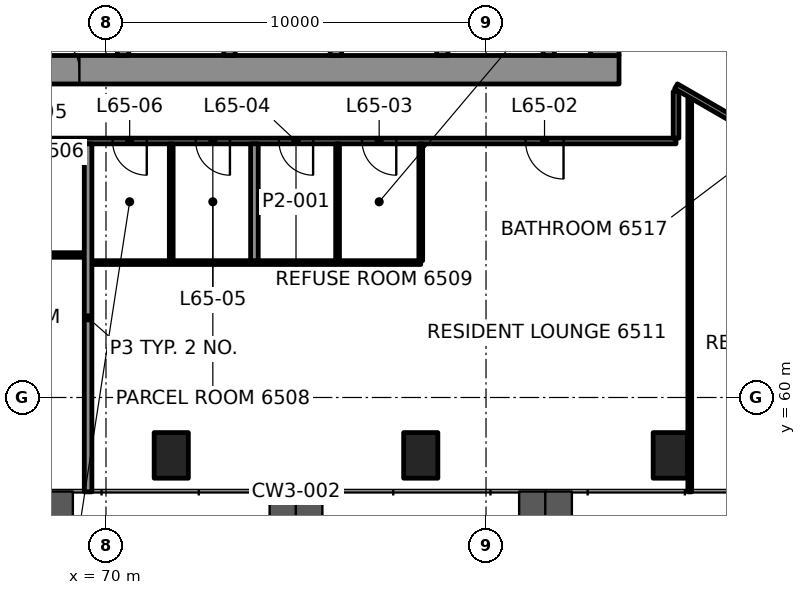
"""IFC4 building model, lengths in metres.
Left out: names, types, materials, properties, quantities, classifications, styles, units other than length and angle.
Written with IfcOpenShell. Run it as: python <this file> out.ifc"""

import sys

from ifc_helpers import new_model, si_unit, direction, frame, frame_2d, origin, origin_2d, place, context, subcontext, project, spatial, rectangle, hollow_rectangle, extrude, element, fill, save


model = new_model("IFC4")
c1 = context("Model", 3, precision=1e-05, world=origin(), true_north=direction((0.0, 1.0)))
c2 = subcontext(c1, "Body", "Model", "MODEL_VIEW")
j1 = project(units=[si_unit("LENGTHUNIT", "METRE"), si_unit("PLANEANGLEUNIT", "RADIAN")], contexts=[c1])
p1 = place(None, origin())
s1 = spatial("IfcSite", under=j1, at=p1, CompositionType="ELEMENT")
p2 = place(p1, origin())
s2 = spatial("IfcBuilding", under=s1, at=p2, CompositionType="ELEMENT")
p3 = place(p2, frame((0.0, 0.0, 274.1)))
s3 = spatial("IfcBuildingStorey", under=s2, at=p3, CompositionType="ELEMENT", Elevation=274.1)
for number, where, z_axis, x_axis in (
    (1, (71.717, 58.476, -0.0), (0.0, 0.0, 1.0), (1.0, 0.0, 0.0)),
    (2, (78.283, 58.476, -0.0), (0.0, 0.0, 1.0), (1.0, 0.0, 0.0)),
    (3, (84.848, 58.476, -0.0), (0.0, 0.0, 1.0), (1.0, 0.0, 0.0)),
):
    element("IfcColumn", number, at=place(p3, frame(where, z_axis=z_axis, x_axis=x_axis)), inside=s3, PredefinedType="COLUMN", context=c2, shape_type="SweptSolid", body=[
        extrude(hollow_rectangle(XDim=0.9, YDim=1.2, WallThickness=0.06, at=origin_2d()), origin(), (0.0, 0.0, 1.0), 3.5),
    ])
p4 = place(p3, frame((66.5, 68.625, 0.0), z_axis=(0.0, 0.0, 1.0), x_axis=(1.0, 0.0, 0.0)))
e4 = element("IfcWall", 4, at=p4, inside=s3, PredefinedType="SHEAR", context=c2, shape_type="SweptSolid", body=[
    extrude(rectangle(XDim=17.0, YDim=0.75, at=frame_2d((8.5, 0.0))), origin(), (0.0, 0.0, 1.0), 3.3),
])
p5 = place(p4, frame((1.9, 0.0, 0.0)))
e5 = element("IfcOpeningElement", 5, at=p5, cuts=e4, PredefinedType="OPENING", context=c2, shape_type="SweptSolid", body=[
    extrude(rectangle(XDim=0.9, YDim=2.1, at=frame_2d((0.45, 1.05))), frame((0.0, 0.385, 0.0), z_axis=(0.0, -1.0, 0.0), x_axis=(1.0, 0.0, 0.0)), (0.0, 0.0, 1.0), 0.77),
])
p6 = place(p3, frame((83.125, 69.0, 0.0), z_axis=(0.0, 0.0, 1.0), x_axis=(0.0, 1.0, 0.0)))
e6 = element("IfcWall", 6, at=p6, inside=s3, PredefinedType="SHEAR", context=c2, shape_type="SweptSolid", body=[
    extrude(rectangle(XDim=12.0, YDim=0.75, at=frame_2d((6.0, 0.0))), origin(), (0.0, 0.0, 1.0), 3.3),
])
p7 = place(p6, frame((3.4, 0.0, 0.0)))
e7 = element("IfcOpeningElement", 7, at=p7, cuts=e6, PredefinedType="OPENING", context=c2, shape_type="SweptSolid", body=[
    extrude(rectangle(XDim=1.8, YDim=2.1, at=frame_2d((0.9, 1.05))), frame((0.0, 0.385, 0.0), z_axis=(0.0, -1.0, 0.0), x_axis=(1.0, 0.0, 0.0)), (0.0, 0.0, 1.0), 0.77),
])
for number, where, z_axis, x_axis in (
    (8, (70.45, 69.0, 0.0), (0.0, 0.0, 1.0), (0.0, 1.0, 0.0)),
    (9, (73.25, 69.0, 0.0), (0.0, 0.0, 1.0), (0.0, 1.0, 0.0)),
    (10, (76.05, 69.0, 0.0), (0.0, 0.0, 1.0), (0.0, 1.0, 0.0)),
    (11, (78.85, 69.0, 0.0), (0.0, 0.0, 1.0), (0.0, 1.0, 0.0)),
    (12, (81.65, 69.0, 0.0), (0.0, 0.0, 1.0), (0.0, 1.0, 0.0)),
):
    element("IfcWall", number, at=place(p3, frame(where, z_axis=z_axis, x_axis=x_axis)), inside=s3, PredefinedType="SHEAR", context=c2, shape_type="SweptSolid", body=[
        extrude(rectangle(XDim=2.6, YDim=0.3, at=frame_2d((1.3, 0.0))), origin(), (0.0, 0.0, 1.0), 3.3),
    ])
p8 = place(p3, frame((69.629, 63.55, 0.0), z_axis=(0.0, 0.0, 1.0), x_axis=(1.0, 0.0, 0.0)))
e13 = element("IfcWall", 13, at=p8, inside=s3, PredefinedType="PARTITIONING", context=c2, shape_type="SweptSolid", body=[
    extrude(rectangle(XDim=8.653, YDim=0.1, at=frame_2d((4.326, 0.0))), origin(), (0.0, 0.0, 1.0), 2.7),
])
p9 = place(p3, frame((63.434, 63.75, 0.0), z_axis=(0.0, 0.0, 1.0), x_axis=(1.0, 0.0, 0.0)))
e14 = element("IfcWall", 14, at=p9, inside=s3, PredefinedType="PARTITIONING", context=c2, shape_type="SweptSolid", body=[
    extrude(rectangle(XDim=5.995, YDim=0.12, at=frame_2d((2.997, 0.0))), origin(), (0.0, 0.0, 1.0), 2.7),
])
p10 = place(p9, frame((3.199, 0.0, 0.0)))
e15 = element("IfcOpeningElement", 15, at=p10, cuts=e14, PredefinedType="OPENING", context=c2, shape_type="SweptSolid", body=[
    extrude(rectangle(XDim=0.9, YDim=2.1, at=frame_2d((0.45, 1.05))), frame((0.0, 0.07, 0.0), z_axis=(0.0, -1.0, 0.0), x_axis=(1.0, 0.0, 0.0)), (0.0, 0.0, 1.0), 0.14),
])
p11 = place(p3, frame((85.0, 66.75, 0.0), z_axis=(0.0, 0.0, 1.0), x_axis=(-1.0, 0.0, 0.0)))
e16 = element("IfcWall", 16, at=p11, inside=s3, PredefinedType="PARTITIONING", context=c2, shape_type="SweptSolid", body=[
    extrude(rectangle(XDim=19.999, YDim=0.15, at=frame_2d((10.0, 0.0))), origin(), (0.0, 0.0, 1.0), 2.7),
])
p12 = place(p11, frame((2.96, 0.0, 0.0)))
e17 = element("IfcOpeningElement", 17, at=p12, cuts=e16, PredefinedType="OPENING", context=c2, shape_type="SweptSolid", body=[
    extrude(rectangle(XDim=1.0, YDim=2.1, at=frame_2d((0.5, 1.05))), frame((0.0, 0.085, 0.0), z_axis=(0.0, -1.0, 0.0), x_axis=(1.0, 0.0, 0.0)), (0.0, 0.0, 1.0), 0.17),
])
p13 = place(p11, frame((7.361, 0.0, 0.0)))
e18 = element("IfcOpeningElement", 18, at=p13, cuts=e16, PredefinedType="OPENING", context=c2, shape_type="SweptSolid", body=[
    extrude(rectangle(XDim=0.9, YDim=2.1, at=frame_2d((0.45, 1.05))), frame((0.0, 0.085, 0.0), z_axis=(0.0, -1.0, 0.0), x_axis=(1.0, 0.0, 0.0)), (0.0, 0.0, 1.0), 0.17),
])
p14 = place(p11, frame((9.55, 0.0, 0.0)))
e19 = element("IfcOpeningElement", 19, at=p14, cuts=e16, PredefinedType="OPENING", context=c2, shape_type="SweptSolid", body=[
    extrude(rectangle(XDim=0.9, YDim=2.1, at=frame_2d((0.45, 1.05))), frame((0.0, 0.085, 0.0), z_axis=(0.0, -1.0, 0.0), x_axis=(1.0, 0.0, 0.0)), (0.0, 0.0, 1.0), 0.17),
])
p15 = place(p11, frame((11.738, 0.0, 0.0)))
e20 = element("IfcOpeningElement", 20, at=p15, cuts=e16, PredefinedType="OPENING", context=c2, shape_type="SweptSolid", body=[
    extrude(rectangle(XDim=0.9, YDim=2.1, at=frame_2d((0.45, 1.05))), frame((0.0, 0.085, 0.0), z_axis=(0.0, -1.0, 0.0), x_axis=(1.0, 0.0, 0.0)), (0.0, 0.0, 1.0), 0.17),
])
p16 = place(p11, frame((13.926, 0.0, 0.0)))
e21 = element("IfcOpeningElement", 21, at=p16, cuts=e16, PredefinedType="OPENING", context=c2, shape_type="SweptSolid", body=[
    extrude(rectangle(XDim=0.9, YDim=2.1, at=frame_2d((0.45, 1.05))), frame((0.0, 0.085, 0.0), z_axis=(0.0, -1.0, 0.0), x_axis=(1.0, 0.0, 0.0)), (0.0, 0.0, 1.0), 0.17),
])
p17 = place(p3, frame((85.361, 57.516, 0.0), z_axis=(0.0, 0.0, 1.0), x_axis=(0.0, 1.0, 0.0)))
e22 = element("IfcWall", 22, at=p17, inside=s3, PredefinedType="PARTITIONING", context=c2, shape_type="SweptSolid", body=[
    extrude(rectangle(XDim=10.346, YDim=0.1, at=frame_2d((5.173, 0.0))), origin(), (0.0, 0.0, 1.0), 2.547),
])
p18 = place(p3, frame((85.0, 66.825, 0.0), z_axis=(0.0, 0.0, 1.0), x_axis=(0.0, 1.0, 0.0)))
e23 = element("IfcWall", 23, at=p18, inside=s3, PredefinedType="PARTITIONING", context=c2, shape_type="SweptSolid", body=[
    extrude(rectangle(XDim=1.225, YDim=0.15, at=frame_2d((0.613, 0.0))), origin(), (0.0, 0.0, 1.0), 2.547),
])
p19 = place(p3, frame((78.283, 63.601, 0.0), z_axis=(0.0, 0.0, 1.0), x_axis=(0.0, 1.0, 0.0)))
e24 = element("IfcWall", 24, at=p19, inside=s3, PredefinedType="PARTITIONING", context=c2, shape_type="SweptSolid", body=[
    extrude(rectangle(XDim=3.074, YDim=0.1, at=frame_2d((1.537, 0.0))), origin(), (0.0, 0.0, 1.0), 2.7),
])
p20 = place(p3, frame((76.094, 63.6, 0.0), z_axis=(0.0, 0.0, 1.0), x_axis=(0.0, 1.0, 0.0)))
e25 = element("IfcWall", 25, at=p20, inside=s3, PredefinedType="PARTITIONING", context=c2, shape_type="SweptSolid", body=[
    extrude(rectangle(XDim=3.075, YDim=0.1, at=frame_2d((1.538, 0.0))), origin(), (0.0, 0.0, 1.0), 2.7),
])
p21 = place(p3, frame((73.906, 63.6, 0.0), z_axis=(0.0, 0.0, 1.0), x_axis=(0.0, 1.0, 0.0)))
e26 = element("IfcWall", 26, at=p21, inside=s3, PredefinedType="PARTITIONING", context=c2, shape_type="SweptSolid", body=[
    extrude(rectangle(XDim=3.075, YDim=0.2, at=frame_2d((1.538, 0.0))), origin(), (0.0, 0.0, 1.0), 2.7),
])
p22 = place(p3, frame((71.717, 63.6, 0.0), z_axis=(0.0, 0.0, 1.0), x_axis=(0.0, 1.0, 0.0)))
e27 = element("IfcWall", 27, at=p22, inside=s3, PredefinedType="PARTITIONING", context=c2, shape_type="SweptSolid", body=[
    extrude(rectangle(XDim=3.075, YDim=0.1, at=frame_2d((1.538, 0.0))), origin(), (0.0, 0.0, 1.0), 2.7),
])
p23 = place(p3, frame((69.529, 57.516, 0.0), z_axis=(0.0, 0.0, 1.0), x_axis=(0.0, 1.0, 0.0)))
e28 = element("IfcWall", 28, at=p23, inside=s3, PredefinedType="PARTITIONING", context=c2, shape_type="SweptSolid", body=[
    extrude(rectangle(XDim=9.159, YDim=0.2, at=frame_2d((4.579, 0.0))), origin(), (0.0, 0.0, 1.0), 2.688),
])
p24 = place(p3, frame((85.0, 70.266, 0.0), z_axis=(0.0, 0.0, 1.0), x_axis=(0.866026970734, -0.499997285954, 0.0)))
e29 = element("IfcWall", 29, at=p24, inside=s3, PredefinedType="PARTITIONING", context=c2, shape_type="SweptSolid", body=[
    extrude(rectangle(XDim=14.584, YDim=0.15, at=frame_2d((7.292, 0.0))), origin(), (0.0, 0.0, 1.0), 2.7),
])
p25 = place(p24, frame((10.094, 0.0, 0.0)))
e30 = element("IfcOpeningElement", 30, at=p25, cuts=e29, PredefinedType="OPENING", context=c2, shape_type="SweptSolid", body=[
    extrude(rectangle(XDim=1.0, YDim=2.1, at=frame_2d((0.5, 1.05))), frame((0.0, 0.085, 0.0), z_axis=(0.0, -1.0, 0.0), x_axis=(1.0, 0.0, 0.0)), (0.0, 0.0, 1.0), 0.17),
])
p26 = place(p3, frame((96.73, 61.415, 0.0), z_axis=(0.0, 0.0, 1.0), x_axis=(-0.866032805753, 0.499987179195, 0.0)))
e31 = element("IfcWall", 31, at=p26, inside=s3, PredefinedType="PARTITIONING", context=c2, shape_type="SweptSolid", body=[
    extrude(rectangle(XDim=13.545, YDim=0.15, at=frame_2d((6.772, 0.0))), origin(), (0.0, 0.0, 1.0), 2.547),
])
p27 = place(p26, frame((2.078, 0.0, 0.0)))
e32 = element("IfcOpeningElement", 32, at=p27, cuts=e31, PredefinedType="OPENING", context=c2, shape_type="SweptSolid", body=[
    extrude(rectangle(XDim=1.0, YDim=2.1, at=frame_2d((0.5, 1.05))), frame((0.0, 0.085, 0.0), z_axis=(0.0, -1.0, 0.0), x_axis=(1.0, 0.0, 0.0)), (0.0, 0.0, 1.0), 0.17),
])
p28 = place(p26, frame((8.54, 0.0, 0.0)))
e33 = element("IfcOpeningElement", 33, at=p28, cuts=e31, PredefinedType="OPENING", context=c2, shape_type="SweptSolid", body=[
    extrude(rectangle(XDim=1.0, YDim=2.1, at=frame_2d((0.5, 1.05))), frame((0.0, 0.085, 0.0), z_axis=(0.0, -1.0, 0.0), x_axis=(1.0, 0.0, 0.0)), (0.0, 0.0, 1.0), 0.17),
])
p29 = place(p12, origin())
e34 = element("IfcDoor", 34, at=p29, inside=s3, OperationType="SINGLE_SWING_LEFT", PredefinedType="DOOR", context=c2, shape_type="SweptSolid", body=[
    extrude(rectangle(XDim=1.0, YDim=2.1, at=frame_2d((0.5, 1.05))), frame((0.0, 0.025, 0.0), z_axis=(0.0, -1.0, 0.0), x_axis=(1.0, 0.0, 0.0)), (0.0, 0.0, 1.0), 0.05),
])
fill(e17, e34)
p30 = place(p13, origin())
e35 = element("IfcDoor", 35, at=p30, inside=s3, OperationType="SINGLE_SWING_RIGHT", PredefinedType="DOOR", context=c2, shape_type="SweptSolid", body=[
    extrude(rectangle(XDim=0.9, YDim=2.1, at=frame_2d((0.45, 1.05))), frame((0.0, 0.025, 0.0), z_axis=(0.0, -1.0, 0.0), x_axis=(1.0, 0.0, 0.0)), (0.0, 0.0, 1.0), 0.05),
])
fill(e18, e35)
p31 = place(p14, origin())
e36 = element("IfcDoor", 36, at=p31, inside=s3, OperationType="SINGLE_SWING_LEFT", PredefinedType="DOOR", context=c2, shape_type="SweptSolid", body=[
    extrude(rectangle(XDim=0.9, YDim=2.1, at=frame_2d((0.45, 1.05))), frame((0.0, 0.025, 0.0), z_axis=(0.0, -1.0, 0.0), x_axis=(1.0, 0.0, 0.0)), (0.0, 0.0, 1.0), 0.05),
])
fill(e19, e36)
p32 = place(p15, origin())
e37 = element("IfcDoor", 37, at=p32, inside=s3, OperationType="SINGLE_SWING_RIGHT", PredefinedType="DOOR", context=c2, shape_type="SweptSolid", body=[
    extrude(rectangle(XDim=0.9, YDim=2.1, at=frame_2d((0.45, 1.05))), frame((0.0, 0.025, 0.0), z_axis=(0.0, -1.0, 0.0), x_axis=(1.0, 0.0, 0.0)), (0.0, 0.0, 1.0), 0.05),
])
fill(e20, e37)
p33 = place(p16, origin())
e38 = element("IfcDoor", 38, at=p33, inside=s3, OperationType="SINGLE_SWING_LEFT", PredefinedType="DOOR", context=c2, shape_type="SweptSolid", body=[
    extrude(rectangle(XDim=0.9, YDim=2.1, at=frame_2d((0.45, 1.05))), frame((0.0, 0.025, 0.0), z_axis=(0.0, -1.0, 0.0), x_axis=(1.0, 0.0, 0.0)), (0.0, 0.0, 1.0), 0.05),
])
fill(e21, e38)
p34 = place(p5, origin())
e39 = element("IfcDoor", 39, at=p34, inside=s3, OperationType="SINGLE_SWING_RIGHT", PredefinedType="DOOR", context=c2, shape_type="SweptSolid", body=[
    extrude(rectangle(XDim=0.9, YDim=2.1, at=frame_2d((0.45, 1.05))), frame((0.0, 0.095, 0.0), z_axis=(0.0, -1.0, 0.0), x_axis=(1.0, 0.0, 0.0)), (0.0, 0.0, 1.0), 0.19),
])
fill(e5, e39)
save(model, sys.argv[1])
